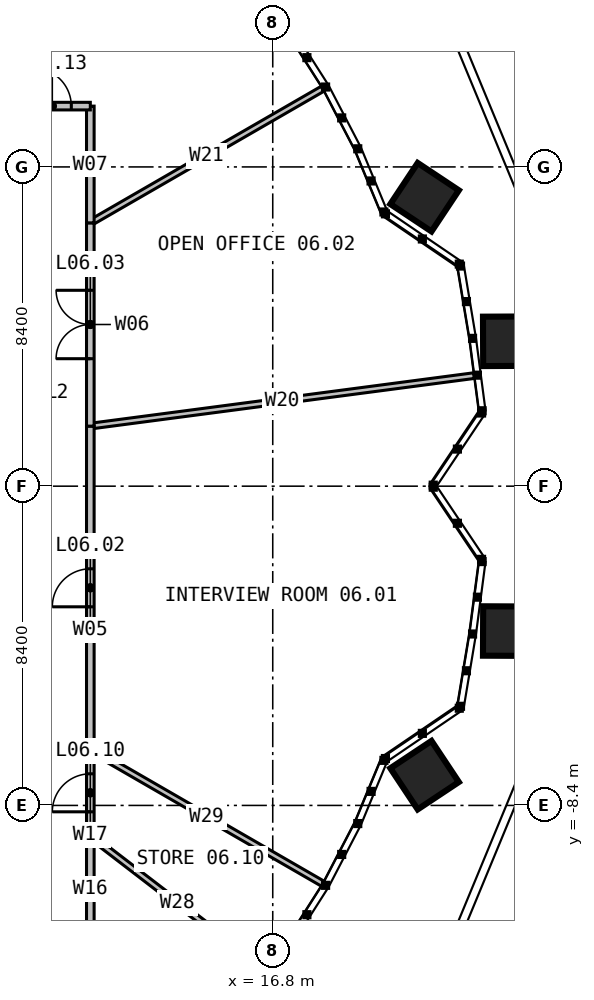
"""IFC4 building model, lengths in metres.
Left out: names, types, materials, properties, quantities, classifications, styles, units other than length and angle.
Written with IfcOpenShell. Run it as: python <this file> out.ifc"""

import sys

from ifc_helpers import new_model, si_unit, direction, frame, frame_2d, origin, place, context, subcontext, project, spatial, rectangle, extrude, element, fill, save


model = new_model("IFC4")
c1 = context("Model", 3, precision=1e-05, world=origin(), true_north=direction((0.0, 1.0)))
c2 = subcontext(c1, "Body", "Model", "MODEL_VIEW")
j1 = project(units=[si_unit("LENGTHUNIT", "METRE"), si_unit("PLANEANGLEUNIT", "RADIAN")], contexts=[c1])
p1 = place(None, origin())
s1 = spatial("IfcSite", under=j1, at=p1, CompositionType="ELEMENT")
p2 = place(p1, origin())
s2 = spatial("IfcBuilding", under=s1, at=p2, CompositionType="ELEMENT")
p3 = place(p2, frame((0.0, 0.0, 29.0)))
s3 = spatial("IfcBuildingStorey", under=s2, at=p3, CompositionType="ELEMENT", Elevation=29.0)
p4 = place(p3, frame((12.0, -6.928, 0.0), z_axis=(0.0, 0.0, 1.0), x_axis=(0.86602254688, -0.500004948271, 0.0)))
e1 = element("IfcWall", 1, at=p4, inside=s3, PredefinedType="PARTITIONING", context=c2, shape_type="SweptSolid", body=[
    extrude(rectangle(XDim=7.057, YDim=0.15, at=frame_2d((3.529, 0.0))), origin(), (0.0, 0.0, 1.0), 2.79),
])
p5 = place(p3, frame((12.0, 1.58, 0.0), z_axis=(0.0, 0.0, 1.0), x_axis=(0.991443519188, 0.130536386729, 0.0)))
e2 = element("IfcWall", 2, at=p5, inside=s3, PredefinedType="PARTITIONING", context=c2, shape_type="SweptSolid", body=[
    extrude(rectangle(XDim=10.182, YDim=0.15, at=frame_2d((5.091, 0.0))), origin(), (0.0, 0.0, 1.0), 2.79),
])
p6 = place(p3, frame((12.0, 6.928, 0.0), z_axis=(0.0, 0.0, 1.0), x_axis=(0.86602254688, 0.500004948271, 0.0)))
e3 = element("IfcWall", 3, at=p6, inside=s3, PredefinedType="PARTITIONING", context=c2, shape_type="SweptSolid", body=[
    extrude(rectangle(XDim=7.057, YDim=0.15, at=frame_2d((3.529, 0.0))), origin(), (0.0, 0.0, 1.0), 2.79),
])
p7 = place(p3, frame((12.0, -9.208, 0.0), z_axis=(0.0, 0.0, 1.0), x_axis=(0.793353539316, -0.608761169634, 0.0)))
e4 = element("IfcWall", 4, at=p7, inside=s3, PredefinedType="PARTITIONING", context=c2, shape_type="SweptSolid", body=[
    extrude(rectangle(XDim=5.768, YDim=0.15, at=frame_2d((2.884, 0.0))), origin(), (0.0, 0.0, 1.0), 2.79),
])
p8 = place(p3, frame((12.0, -6.928, 0.0), z_axis=(0.0, 0.0, 1.0), x_axis=(0.0, 1.0, 0.0)))
e5 = element("IfcWall", 5, at=p8, inside=s3, PredefinedType="PARTITIONING", context=c2, shape_type="SweptSolid", body=[
    extrude(rectangle(XDim=8.508, YDim=0.2, at=frame_2d((4.254, 0.0))), origin(), (0.0, 0.0, 1.0), 3.8),
])
p9 = place(p8, frame((3.754, 0.0, 0.0)))
e6 = element("IfcOpeningElement", 6, at=p9, cuts=e5, PredefinedType="OPENING", context=c2, shape_type="SweptSolid", body=[
    extrude(rectangle(XDim=1.0, YDim=2.2, at=frame_2d((0.5, 1.1))), frame((0.0, 0.11, 0.0), z_axis=(0.0, -1.0, 0.0), x_axis=(1.0, 0.0, 0.0)), (0.0, 0.0, 1.0), 0.22),
])
p10 = place(p3, frame((12.0, 1.58, 0.0), z_axis=(0.0, 0.0, 1.0), x_axis=(0.0, 1.0, 0.0)))
e7 = element("IfcWall", 7, at=p10, inside=s3, PredefinedType="PARTITIONING", context=c2, shape_type="SweptSolid", body=[
    extrude(rectangle(XDim=5.348, YDim=0.2, at=frame_2d((2.674, 0.0))), origin(), (0.0, 0.0, 1.0), 3.8),
])
p11 = place(p10, frame((1.774, 0.0, 0.0)))
e8 = element("IfcOpeningElement", 8, at=p11, cuts=e7, PredefinedType="OPENING", context=c2, shape_type="SweptSolid", body=[
    extrude(rectangle(XDim=1.8, YDim=2.2, at=frame_2d((0.9, 1.1))), frame((0.0, 0.11, 0.0), z_axis=(0.0, -1.0, 0.0), x_axis=(1.0, 0.0, 0.0)), (0.0, 0.0, 1.0), 0.22),
])
p12 = place(p3, frame((12.0, 6.928, 0.0), z_axis=(0.0, 0.0, 1.0), x_axis=(0.0, 1.0, 0.0)))
e9 = element("IfcWall", 9, at=p12, inside=s3, PredefinedType="PARTITIONING", context=c2, shape_type="SweptSolid", body=[
    extrude(rectangle(XDim=3.072, YDim=0.2, at=frame_2d((1.536, 0.0))), origin(), (0.0, 0.0, 1.0), 3.8),
])
p13 = place(p3, frame((12.0, -12.0, 0.0), z_axis=(0.0, 0.0, 1.0), x_axis=(0.0, 1.0, 0.0)))
e10 = element("IfcWall", 10, at=p13, inside=s3, PredefinedType="PARTITIONING", context=c2, shape_type="SweptSolid", body=[
    extrude(rectangle(XDim=2.792, YDim=0.2, at=frame_2d((1.396, 0.0))), origin(), (0.0, 0.0, 1.0), 3.8),
])
p14 = place(p3, frame((12.0, -9.208, 0.0), z_axis=(0.0, 0.0, 1.0), x_axis=(0.0, 1.0, 0.0)))
e11 = element("IfcWall", 11, at=p14, inside=s3, PredefinedType="PARTITIONING", context=c2, shape_type="SweptSolid", body=[
    extrude(rectangle(XDim=2.28, YDim=0.2, at=frame_2d((1.14, 0.0))), origin(), (0.0, 0.0, 1.0), 3.8),
])
p15 = place(p14, frame((0.64, 0.0, 0.0)))
e12 = element("IfcOpeningElement", 12, at=p15, cuts=e11, PredefinedType="OPENING", context=c2, shape_type="SweptSolid", body=[
    extrude(rectangle(XDim=1.0, YDim=2.2, at=frame_2d((0.5, 1.1))), frame((0.0, 0.11, 0.0), z_axis=(0.0, -1.0, 0.0), x_axis=(1.0, 0.0, 0.0)), (0.0, 0.0, 1.0), 0.22),
])
p16 = place(p3, frame((10.0, 10.0, 0.0), z_axis=(0.0, 0.0, 1.0), x_axis=(1.0, 0.0, 0.0)))
e13 = element("IfcWall", 13, at=p16, inside=s3, PredefinedType="PARTITIONING", context=c2, shape_type="SweptSolid", body=[
    extrude(rectangle(XDim=2.0, YDim=0.2, at=frame_2d((1.0, 0.0))), origin(), (0.0, 0.0, 1.0), 3.8),
])
p17 = place(p16, frame((0.5, 0.0, 0.0)))
e14 = element("IfcOpeningElement", 14, at=p17, cuts=e13, PredefinedType="OPENING", context=c2, shape_type="SweptSolid", body=[
    extrude(rectangle(XDim=1.0, YDim=2.2, at=frame_2d((0.5, 1.1))), frame((0.0, 0.11, 0.0), z_axis=(0.0, -1.0, 0.0), x_axis=(1.0, 0.0, 0.0)), (0.0, 0.0, 1.0), 0.22),
])
p18 = place(p9, origin())
e15 = element("IfcDoor", 15, at=p18, inside=s3, OperationType="SINGLE_SWING_LEFT", PredefinedType="DOOR", context=c2, shape_type="SweptSolid", body=[
    extrude(rectangle(XDim=1.0, YDim=2.2, at=frame_2d((0.5, 1.1))), frame((0.0, 0.025, 0.0), z_axis=(0.0, -1.0, 0.0), x_axis=(1.0, 0.0, 0.0)), (0.0, 0.0, 1.0), 0.05),
])
fill(e6, e15)
p19 = place(p11, origin())
e16 = element("IfcDoor", 16, at=p19, inside=s3, OperationType="DOUBLE_DOOR_SINGLE_SWING", PredefinedType="DOOR", context=c2, shape_type="SweptSolid", body=[
    extrude(rectangle(XDim=1.8, YDim=2.2, at=frame_2d((0.9, 1.1))), frame((0.0, 0.025, 0.0), z_axis=(0.0, -1.0, 0.0), x_axis=(1.0, 0.0, 0.0)), (0.0, 0.0, 1.0), 0.05),
])
fill(e8, e16)
p20 = place(p15, origin())
e17 = element("IfcDoor", 17, at=p20, inside=s3, OperationType="SINGLE_SWING_LEFT", PredefinedType="DOOR", context=c2, shape_type="SweptSolid", body=[
    extrude(rectangle(XDim=1.0, YDim=2.2, at=frame_2d((0.5, 1.1))), frame((0.0, 0.025, 0.0), z_axis=(0.0, -1.0, 0.0), x_axis=(1.0, 0.0, 0.0)), (0.0, 0.0, 1.0), 0.05),
])
fill(e12, e17)
p21 = place(p17, origin())
e18 = element("IfcDoor", 18, at=p21, inside=s3, OperationType="SINGLE_SWING_LEFT", PredefinedType="DOOR", context=c2, shape_type="SweptSolid", body=[
    extrude(rectangle(XDim=1.0, YDim=2.2, at=frame_2d((0.5, 1.1))), frame((0.0, 0.025, 0.0), z_axis=(0.0, -1.0, 0.0), x_axis=(1.0, 0.0, 0.0)), (0.0, 0.0, 1.0), 0.05),
])
fill(e14, e18)
save(model, sys.argv[1])
